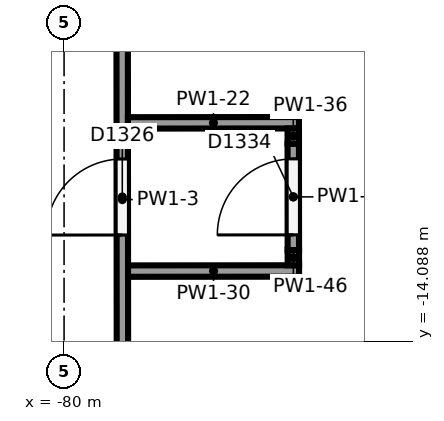
"""IFC4 building model, lengths in metres.
Left out: names, types, materials, properties, quantities, classifications, styles, units other than length and angle.
Written with IfcOpenShell. Run it as: python <this file> out.ifc"""

import sys

from ifc_helpers import new_model, si_unit, direction, frame, frame_2d, origin, place, context, subcontext, project, spatial, rectangle, extrude, element, fill, save


model = new_model("IFC4")
c1 = context("Model", 3, precision=1e-05, world=origin(), true_north=direction((0.0, 1.0)))
c2 = subcontext(c1, "Body", "Model", "MODEL_VIEW")
j1 = project(units=[si_unit("LENGTHUNIT", "METRE"), si_unit("PLANEANGLEUNIT", "RADIAN")], contexts=[c1])
p1 = place(None, origin())
s1 = spatial("IfcSite", under=j1, at=p1, CompositionType="ELEMENT")
p2 = place(p1, origin())
s2 = spatial("IfcBuilding", under=s1, at=p2, CompositionType="ELEMENT")
p3 = place(p2, frame((0.0, 0.0, 18.0)))
s3 = spatial("IfcBuildingStorey", under=s2, at=p3, CompositionType="ELEMENT", Elevation=18.0)
p4 = place(p3, frame((-79.23, -17.64, 0.0), z_axis=(0.0, 0.0, 1.0), x_axis=(-0.0007662833, 0.999999706405, 0.0)))
e1 = element("IfcWall", 1, at=p4, inside=s3, PredefinedType="PARTITIONING", context=c2, shape_type="SweptSolid", body=[
    extrude(rectangle(XDim=10.833, YDim=0.15, at=frame_2d((5.416, 0.0))), origin(), (0.0, 0.0, 1.0), 3.574),
])
p5 = place(p4, frame((4.95, 0.0, 0.0)))
e2 = element("IfcOpeningElement", 2, at=p5, cuts=e1, PredefinedType="OPENING", context=c2, shape_type="SweptSolid", body=[
    extrude(rectangle(XDim=1.0, YDim=2.1, at=frame_2d((0.5, 1.05))), frame((0.0, 0.085, 0.0), z_axis=(0.0, -1.0, 0.0), x_axis=(1.0, 0.0, 0.0)), (0.0, 0.0, 1.0), 0.17),
])
p6 = place(p3, frame((-79.158, -13.165, 0.0), z_axis=(0.0, 0.0, 1.0), x_axis=(0.999999711543, 0.000759548392, 0.0)))
e3 = element("IfcWall", 3, at=p6, inside=s3, PredefinedType="PARTITIONING", context=c2, shape_type="SweptSolid", body=[
    extrude(rectangle(XDim=2.25, YDim=0.15, at=frame_2d((1.125, 0.0))), origin(), (0.0, 0.0, 1.0), 5.664),
])
p7 = place(p3, frame((-79.16, -11.215, 0.0), z_axis=(0.0, 0.0, 1.0), x_axis=(0.999999711543, 0.000759548392, 0.0)))
e4 = element("IfcWall", 4, at=p7, inside=s3, PredefinedType="PARTITIONING", context=c2, shape_type="SweptSolid", body=[
    extrude(rectangle(XDim=2.25, YDim=0.15, at=frame_2d((1.125, 0.0))), origin(), (0.0, 0.0, 1.0), 5.638),
])
p8 = place(p3, frame((-76.983, -13.088, 0.0), z_axis=(0.0, 0.0, 1.0), x_axis=(-0.001221000311, 0.999999254579, 0.0)))
e5 = element("IfcWall", 5, at=p8, inside=s3, PredefinedType="PARTITIONING", context=c2, shape_type="SweptSolid", body=[
    extrude(rectangle(XDim=0.2, YDim=0.15, at=frame_2d((0.1, 0.0))), origin(), (0.0, 0.0, 1.0), 5.707),
])
p9 = place(p3, frame((-76.983, -12.888, 0.0), z_axis=(0.0, 0.0, 1.0), x_axis=(-0.000871991297, 0.999999619816, 0.0)))
e6 = element("IfcWall", 6, at=p9, inside=s3, PredefinedType="PARTITIONING", context=c2, shape_type="SweptSolid", body=[
    extrude(rectangle(XDim=1.4, YDim=0.15, at=frame_2d((0.7, 0.0))), origin(), (0.0, 0.0, 1.0), 5.689),
])
p10 = place(p9, frame((0.2, 0.0, 0.0)))
e7 = element("IfcOpeningElement", 7, at=p10, cuts=e6, PredefinedType="OPENING", context=c2, shape_type="SweptSolid", body=[
    extrude(rectangle(XDim=1.0, YDim=2.1, at=frame_2d((0.5, 1.05))), frame((0.0, 0.085, 0.0), z_axis=(0.0, -1.0, 0.0), x_axis=(1.0, 0.0, 0.0)), (0.0, 0.0, 1.0), 0.17),
])
p11 = place(p3, frame((-76.985, -11.489, 0.0), z_axis=(0.0, 0.0, 1.0), x_axis=(0.0, 1.0, 0.0)))
e8 = element("IfcWall", 8, at=p11, inside=s3, PredefinedType="PARTITIONING", context=c2, shape_type="SweptSolid", body=[
    extrude(rectangle(XDim=0.2, YDim=0.15, at=frame_2d((0.1, 0.0))), origin(), (0.0, 0.0, 1.0), 5.686),
])
p12 = place(p5, origin())
e9 = element("IfcDoor", 9, at=p12, inside=s3, OperationType="SINGLE_SWING_LEFT", PredefinedType="DOOR", context=c2, shape_type="SweptSolid", body=[
    extrude(rectangle(XDim=1.0, YDim=2.1, at=frame_2d((0.5, 1.05))), frame((0.0, 0.025, 0.0), z_axis=(0.0, -1.0, 0.0), x_axis=(1.0, 0.0, 0.0)), (0.0, 0.0, 1.0), 0.05),
])
fill(e2, e9)
p13 = place(p10, origin())
e10 = element("IfcDoor", 10, at=p13, inside=s3, OperationType="SINGLE_SWING_LEFT", PredefinedType="DOOR", context=c2, shape_type="SweptSolid", body=[
    extrude(rectangle(XDim=1.0, YDim=2.1, at=frame_2d((0.5, 1.05))), frame((0.0, 0.025, 0.0), z_axis=(0.0, -1.0, 0.0), x_axis=(1.0, 0.0, 0.0)), (0.0, 0.0, 1.0), 0.05),
])
fill(e7, e10)
save(model, sys.argv[1])
